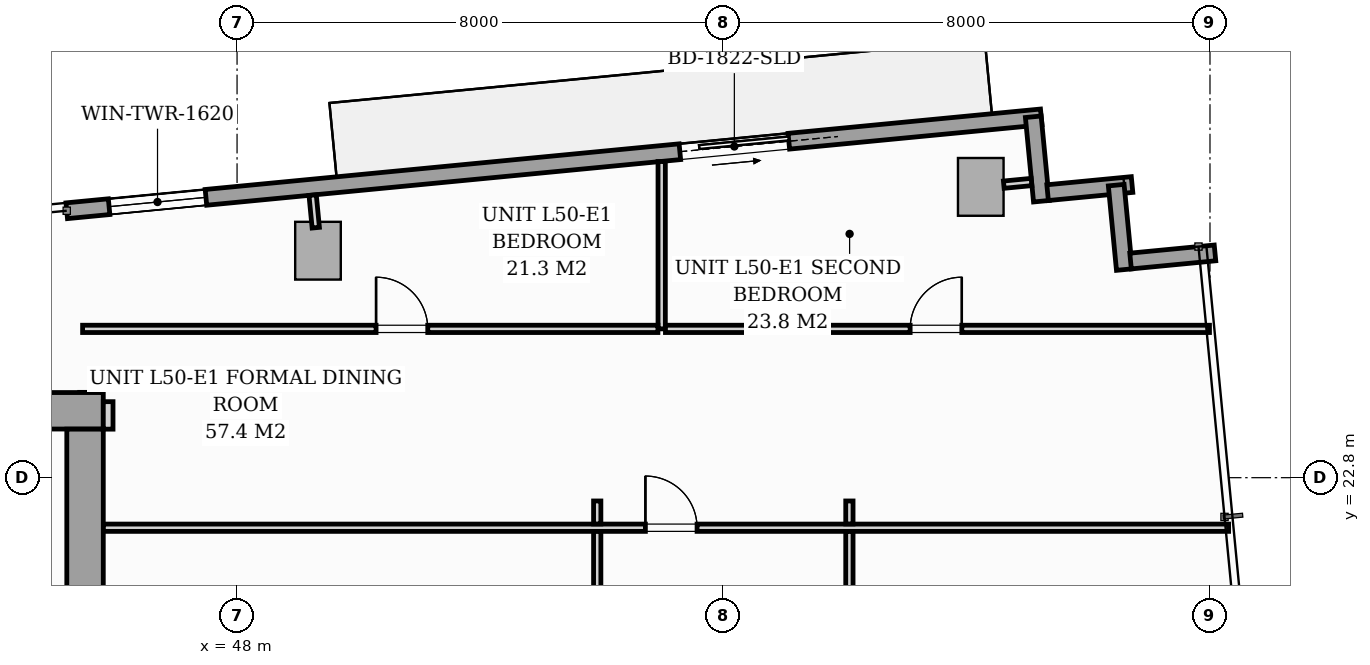
"""IFC4 building model, lengths in metres.
Left out: names, types, materials, properties, quantities, classifications, styles, units other than length and angle.
Written with IfcOpenShell. Run it as: python <this file> out.ifc"""

import sys

from ifc_helpers import new_model, si_unit, direction, frame, frame_2d, origin, origin_2d, place, context, subcontext, project, spatial, rectangle, i_section, extrude, source, transform, mapped, element, fill, save


model = new_model("IFC4")
c1 = context("Model", 3, precision=1e-05, world=origin(), true_north=direction((0.0, 1.0)))
c2 = subcontext(c1, "Body", "Model", "MODEL_VIEW")
j1 = project(units=[si_unit("LENGTHUNIT", "METRE"), si_unit("PLANEANGLEUNIT", "RADIAN")], contexts=[c1])
p1 = place(None, origin())
s1 = spatial("IfcSite", under=j1, at=p1, CompositionType="ELEMENT")
p2 = place(p1, origin())
s2 = spatial("IfcBuilding", under=s1, at=p2, CompositionType="ELEMENT")
p3 = place(p2, frame((0.0, 0.0, 176.2)))
s3 = spatial("IfcBuildingStorey", under=s2, at=p3, CompositionType="ELEMENT", Elevation=176.2)
m1 = source(origin(), c2, "Body", "SweptSolid", [
    extrude(i_section(OverallWidth=0.416, OverallDepth=0.446, WebThickness=0.039, FlangeThickness=0.063, FilletRadius=0.018, at=origin_2d()), origin(), (0.0, 0.0, 1.0), 3.196),
])
p4 = place(p3, frame((45.6, 24.0, 0.002), z_axis=(0.0, 0.0, 1.0), x_axis=(1.0, 0.0, 0.0)))
e1 = element("IfcColumn", 1, at=p4, inside=s3, PredefinedType="PILASTER", context=c2, shape_type="MappedRepresentation", body=[
    mapped(m1, transform((0.0, 0.0, 0.0), scale=1.0)),
])
m2 = source(origin(), c2, "Body", "SweptSolid", [
    extrude(rectangle(XDim=0.75, YDim=0.95, at=origin_2d()), origin(), (0.0, 0.0, 1.0), 3.196),
])
for number, where, z_axis, x_axis in (
    (2, (49.331, 26.533, 0.002), (0.0, 0.0, 1.0), (0.995, 0.096, 0.0)),
    (3, (60.23, 27.582, 0.002), (0.0, 0.0, 1.0), (0.995, 0.096, 0.0)),
):
    element("IfcColumn", number, at=place(p3, frame(where, z_axis=z_axis, x_axis=x_axis)), inside=s3, PredefinedType="COLUMN", context=c2, shape_type="MappedRepresentation", body=[
        mapped(m2, transform((0.0, 0.0, 0.0), scale=1.0)),
    ])
p5 = place(p3, frame((45.199, 27.19, 0.0), z_axis=(0.0, 0.0, 1.0), x_axis=(0.995397074604, 0.095836652014, 0.0)))
e4 = element("IfcWall", 4, at=p5, inside=s3, PredefinedType="STANDARD", context=c2, shape_type="SweptSolid", body=[
    extrude(rectangle(XDim=16.1, YDim=0.26, at=frame_2d((8.05, 0.0))), origin(), (0.0, 0.0, 1.0), 2.94),
])
p6 = place(p5, frame((10.13, 0.0, 0.0)))
e5 = element("IfcOpeningElement", 5, at=p6, cuts=e4, PredefinedType="OPENING", context=c2, shape_type="SweptSolid", body=[
    extrude(rectangle(XDim=1.8, YDim=2.06, at=frame_2d((0.9, 1.03))), frame((0.0, 0.14, 0.0), z_axis=(0.0, -1.0, 0.0), x_axis=(1.0, 0.0, 0.0)), (0.0, 0.0, 1.0), 0.28),
])
p7 = place(p5, frame((0.7, 0.0, 0.65)))
e6 = element("IfcOpeningElement", 6, at=p7, cuts=e4, PredefinedType="OPENING", context=c2, shape_type="SweptSolid", body=[
    extrude(rectangle(XDim=1.6, YDim=1.5, at=frame_2d((0.8, 0.75))), frame((0.0, 0.14, 0.0), z_axis=(0.0, -1.0, 0.0), x_axis=(1.0, 0.0, 0.0)), (0.0, 0.0, 1.0), 0.28),
])
p8 = place(p3, frame((61.094, 28.735, 0.0), z_axis=(0.0, 0.0, 1.0), x_axis=(0.095742423056, -0.99540614245, 0.0)))
e7 = element("IfcWall", 7, at=p8, inside=s3, PredefinedType="STANDARD", context=c2, shape_type="SweptSolid", body=[
    extrude(rectangle(XDim=1.395, YDim=0.26, at=frame_2d((0.697, 0.0))), origin(), (0.0, 0.0, 1.0), 2.94),
])
p9 = place(p3, frame((61.33, 27.487, 0.0), z_axis=(0.0, 0.0, 1.0), x_axis=(0.995391056452, 0.09589913835, 0.0)))
e8 = element("IfcWall", 8, at=p9, inside=s3, PredefinedType="STANDARD", context=c2, shape_type="SweptSolid", body=[
    extrude(rectangle(XDim=1.395, YDim=0.26, at=frame_2d((0.698, 0.0))), origin(), (0.0, 0.0, 1.0), 2.94),
])
for number, where, z_axis, x_axis in (
    (9, (62.458, 27.611, 0.0), (0.0, 0.0, 1.0), (0.096, -0.995, 0.0)),
    (10, (62.694, 26.363, 0.0), (0.0, 0.0, 1.0), (0.995, 0.096, 0.0)),
):
    element("IfcWall", number, at=place(p3, frame(where, z_axis=z_axis, x_axis=x_axis)), inside=s3, PredefinedType="STANDARD", context=c2, shape_type="SweptSolid", body=[
        extrude(rectangle(XDim=1.395, YDim=0.26, at=frame_2d((0.697, 0.0))), origin(), (0.0, 0.0, 1.0), 2.94),
    ])
p10 = place(p3, frame((26.2, 23.9, 0.0), z_axis=(0.0, 0.0, 1.0), x_axis=(1.0, 0.0, 0.0)))
e11 = element("IfcWall", 11, at=p10, inside=s3, PredefinedType="SHEAR", context=c2, shape_type="SweptSolid", body=[
    extrude(rectangle(XDim=19.6, YDim=0.6, at=frame_2d((9.8, 0.0))), origin(), (0.0, 0.0, 1.0), 3.2),
])
p11 = place(p3, frame((45.5, 17.802, 0.0), z_axis=(0.0, 0.0, 1.0), x_axis=(0.0, 1.0, 0.0)))
e12 = element("IfcWall", 12, at=p11, inside=s3, PredefinedType="SHEAR", context=c2, shape_type="SweptSolid", body=[
    extrude(rectangle(XDim=5.796, YDim=0.6, at=frame_2d((2.898, 0.0))), origin(), (0.0, 0.0, 1.0), 3.2),
])
p12 = place(p3, frame((45.88, 23.598, 0.0), z_axis=(0.0, 0.0, 1.0), x_axis=(0.0, 1.0, 0.0)))
e13 = element("IfcWall", 13, at=p12, inside=s3, PredefinedType="PARTITIONING", context=c2, shape_type="SweptSolid", body=[
    extrude(rectangle(XDim=0.452, YDim=0.16, at=frame_2d((0.226, 0.0))), origin(), (0.0, 0.0, 1.0), 2.94),
])
p13 = place(p3, frame((54.983, 25.247, 0.0), z_axis=(0.0, 0.0, 1.0), x_axis=(0.0, 1.0, 0.0)))
e14 = element("IfcWall", 14, at=p13, inside=s3, PredefinedType="PARTITIONING", context=c2, shape_type="SweptSolid", body=[
    extrude(rectangle(XDim=2.752, YDim=0.12, at=frame_2d((1.376, 0.0))), origin(), (0.0, 0.0, 1.0), 2.94),
])
p14 = place(p3, frame((45.46, 25.247, 0.0), z_axis=(0.0, 0.0, 1.0), x_axis=(1.0, 0.0, 0.0)))
e15 = element("IfcWall", 15, at=p14, inside=s3, PredefinedType="PARTITIONING", context=c2, shape_type="SweptSolid", body=[
    extrude(rectangle(XDim=9.461, YDim=0.12, at=frame_2d((4.73, 0.0))), origin(), (0.0, 0.0, 1.0), 2.94),
])
p15 = place(p14, frame((4.826, 0.0, 0.0)))
e16 = element("IfcOpeningElement", 16, at=p15, cuts=e15, PredefinedType="OPENING", context=c2, shape_type="SweptSolid", body=[
    extrude(rectangle(XDim=0.85, YDim=2.05, at=frame_2d((0.425, 1.025))), frame((0.0, 0.07, 0.0), z_axis=(0.0, -1.0, 0.0), x_axis=(1.0, 0.0, 0.0)), (0.0, 0.0, 1.0), 0.14),
])
p16 = place(p3, frame((55.045, 25.247, 0.0), z_axis=(0.0, 0.0, 1.0), x_axis=(1.0, 0.0, 0.0)))
e17 = element("IfcWall", 17, at=p16, inside=s3, PredefinedType="PARTITIONING", context=c2, shape_type="SweptSolid", body=[
    extrude(rectangle(XDim=8.947, YDim=0.12, at=frame_2d((4.473, 0.0))), origin(), (0.0, 0.0, 1.0), 2.94),
])
p17 = place(p16, frame((4.024, 0.0, 0.0)))
e18 = element("IfcOpeningElement", 18, at=p17, cuts=e17, PredefinedType="OPENING", context=c2, shape_type="SweptSolid", body=[
    extrude(rectangle(XDim=0.85, YDim=2.05, at=frame_2d((0.425, 1.025))), frame((0.0, 0.07, 0.0), z_axis=(0.0, -1.0, 0.0), x_axis=(1.0, 0.0, 0.0)), (0.0, 0.0, 1.0), 0.14),
])
p18 = place(p3, frame((45.802, 21.977, 0.0), z_axis=(0.0, 0.0, 1.0), x_axis=(1.0, 0.0, 0.0)))
e19 = element("IfcWall", 19, at=p18, inside=s3, PredefinedType="PARTITIONING", context=c2, shape_type="SweptSolid", body=[
    extrude(rectangle(XDim=18.504, YDim=0.12, at=frame_2d((9.252, 0.0))), origin(), (0.0, 0.0, 1.0), 2.94),
])
p19 = place(p18, frame((8.913, 0.0, 0.0)))
e20 = element("IfcOpeningElement", 20, at=p19, cuts=e19, PredefinedType="OPENING", context=c2, shape_type="SweptSolid", body=[
    extrude(rectangle(XDim=0.85, YDim=2.05, at=frame_2d((0.425, 1.025))), frame((0.0, 0.07, 0.0), z_axis=(0.0, -1.0, 0.0), x_axis=(1.0, 0.0, 0.0)), (0.0, 0.0, 1.0), 0.14),
])
p20 = place(p3, frame((58.07, 11.44, 0.0), z_axis=(0.0, 0.0, 1.0), x_axis=(0.0, 1.0, 0.0)))
e21 = element("IfcWall", 21, at=p20, inside=s3, PredefinedType="PARTITIONING", context=c2, shape_type="SweptSolid", body=[
    extrude(rectangle(XDim=10.475, YDim=0.12, at=frame_2d((5.238, 0.0))), origin(), (0.0, 0.0, 1.0), 2.94),
])
p21 = place(p20, frame((4.812, 0.0, 0.0)))
e22 = element("IfcOpeningElement", 22, at=p21, cuts=e21, PredefinedType="OPENING", context=c2, shape_type="SweptSolid", body=[
    extrude(rectangle(XDim=0.85, YDim=2.05, at=frame_2d((0.425, 1.025))), frame((0.0, 0.07, 0.0), z_axis=(0.0, -1.0, 0.0), x_axis=(1.0, 0.0, 0.0)), (0.0, 0.0, 1.0), 0.14),
])
p22 = place(p3, frame((58.07, 22.039, 0.0), z_axis=(0.0, 0.0, 1.0), x_axis=(0.0, 1.0, 0.0)))
e23 = element("IfcWall", 23, at=p22, inside=s3, PredefinedType="PARTITIONING", context=c2, shape_type="SweptSolid", body=[
    extrude(rectangle(XDim=0.378, YDim=0.12, at=frame_2d((0.189, 0.0))), origin(), (0.0, 0.0, 1.0), 2.94),
])
p23 = place(p3, frame((53.923, 11.44, 0.0), z_axis=(0.0, 0.0, 1.0), x_axis=(0.0, 1.0, 0.0)))
e24 = element("IfcWall", 24, at=p23, inside=s3, PredefinedType="PARTITIONING", context=c2, shape_type="SweptSolid", body=[
    extrude(rectangle(XDim=10.475, YDim=0.12, at=frame_2d((5.238, 0.0))), origin(), (0.0, 0.0, 1.0), 2.94),
])
p24 = place(p23, frame((4.812, 0.0, 0.0)))
e25 = element("IfcOpeningElement", 25, at=p24, cuts=e24, PredefinedType="OPENING", context=c2, shape_type="SweptSolid", body=[
    extrude(rectangle(XDim=0.85, YDim=2.05, at=frame_2d((0.425, 1.025))), frame((0.0, 0.07, 0.0), z_axis=(0.0, -1.0, 0.0), x_axis=(1.0, 0.0, 0.0)), (0.0, 0.0, 1.0), 0.14),
])
p25 = place(p3, frame((53.923, 22.039, 0.0), z_axis=(0.0, 0.0, 1.0), x_axis=(0.0, 1.0, 0.0)))
e26 = element("IfcWall", 26, at=p25, inside=s3, PredefinedType="PARTITIONING", context=c2, shape_type="SweptSolid", body=[
    extrude(rectangle(XDim=0.378, YDim=0.12, at=frame_2d((0.189, 0.0))), origin(), (0.0, 0.0, 1.0), 2.94),
])
p26 = place(p3, frame((49.294, 26.911, 0.0), z_axis=(0.0, 0.0, 1.0), x_axis=(-0.095772948675, 0.995403205893, 0.0)))
e27 = element("IfcWall", 27, at=p26, inside=s3, PredefinedType="PARTITIONING", context=c2, shape_type="SweptSolid", body=[
    extrude(rectangle(XDim=0.538, YDim=0.12, at=frame_2d((0.269, 0.0))), origin(), (0.0, 0.0, 1.0), 2.94),
])
p27 = place(p3, frame((60.609, 27.618, 0.0), z_axis=(0.0, 0.0, 1.0), x_axis=(0.995384576284, 0.09596637586, 0.0)))
e28 = element("IfcWall", 28, at=p27, inside=s3, PredefinedType="PARTITIONING", context=c2, shape_type="SweptSolid", body=[
    extrude(rectangle(XDim=0.458, YDim=0.12, at=frame_2d((0.229, 0.0))), origin(), (0.0, 0.0, 1.0), 2.94),
])
m3 = source(origin(), c2, "Body", "SweptSolid", [
    extrude(rectangle(XDim=1.8, YDim=2.06, at=frame_2d((0.9, 1.03))), frame((0.0, 0.025, 0.0), z_axis=(0.0, -1.0, 0.0), x_axis=(1.0, 0.0, 0.0)), (0.0, 0.0, 1.0), 0.05),
])
p28 = place(p6, origin())
e29 = element("IfcDoor", 29, at=p28, inside=s3, OperationType="SLIDING_TO_RIGHT", PredefinedType="DOOR", context=c2, shape_type="MappedRepresentation", body=[
    mapped(m3, transform((0.0, 0.0, 0.0), scale=1.0)),
])
fill(e5, e29)
m4 = source(origin(), c2, "Body", "SweptSolid", [
    extrude(rectangle(XDim=1.6, YDim=1.5, at=frame_2d((0.8, 0.75))), frame((0.0, 0.03, 0.0), z_axis=(0.0, -1.0, 0.0), x_axis=(1.0, 0.0, 0.0)), (0.0, 0.0, 1.0), 0.06),
])
p29 = place(p7, origin())
e30 = element("IfcWindow", 30, at=p29, inside=s3, PartitioningType="SINGLE_PANEL", PredefinedType="WINDOW", context=c2, shape_type="MappedRepresentation", body=[
    mapped(m4, transform((0.0, 0.0, 0.0), scale=1.0)),
])
fill(e6, e30)
m5 = source(origin(), c2, "Body", "SweptSolid", [
    extrude(rectangle(XDim=0.85, YDim=2.05, at=frame_2d((0.425, 1.025))), frame((0.0, 0.025, 0.0), z_axis=(0.0, -1.0, 0.0), x_axis=(1.0, 0.0, 0.0)), (0.0, 0.0, 1.0), 0.05),
])
p30 = place(p15, origin())
e31 = element("IfcDoor", 31, at=p30, inside=s3, OperationType="SINGLE_SWING_LEFT", PredefinedType="DOOR", context=c2, shape_type="MappedRepresentation", body=[
    mapped(m5, transform((0.0, 0.0, 0.0), scale=1.0)),
])
fill(e16, e31)
p31 = place(p17, origin())
e32 = element("IfcDoor", 32, at=p31, inside=s3, OperationType="SINGLE_SWING_RIGHT", PredefinedType="DOOR", context=c2, shape_type="MappedRepresentation", body=[
    mapped(m5, transform((0.0, 0.0, 0.0), scale=1.0)),
])
fill(e18, e32)
p32 = place(p19, origin())
e33 = element("IfcDoor", 33, at=p32, inside=s3, OperationType="SINGLE_SWING_LEFT", PredefinedType="DOOR", context=c2, shape_type="MappedRepresentation", body=[
    mapped(m5, transform((0.0, 0.0, 0.0), scale=1.0)),
])
fill(e20, e33)
save(model, sys.argv[1])
